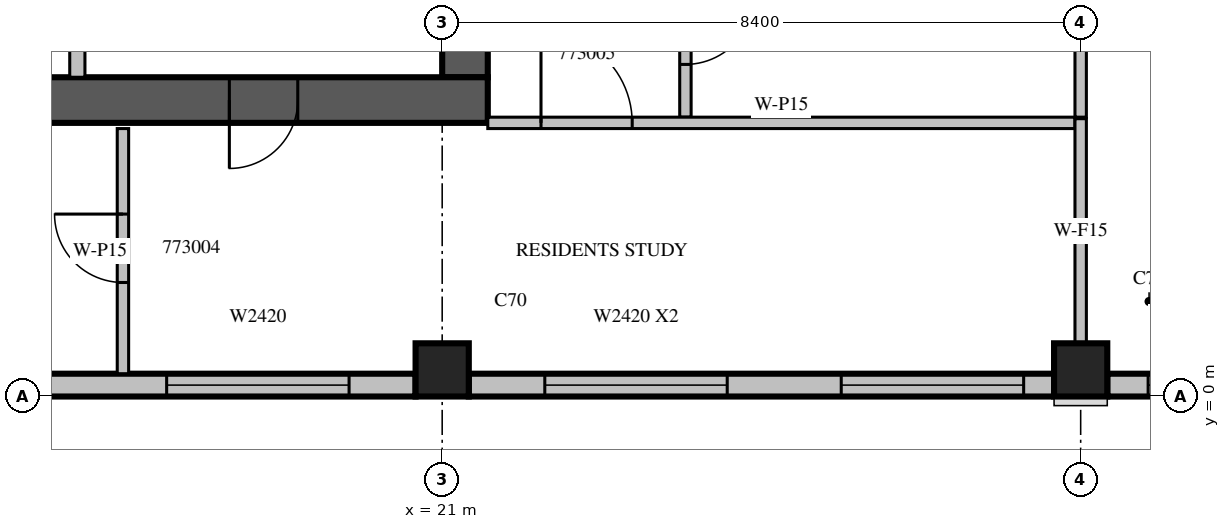
"""IFC4 building model, lengths in metres.
Left out: names, types, materials, properties, quantities, classifications, styles, units other than length and angle.
Written with IfcOpenShell. Run it as: python <this file> out.ifc"""

import sys

from ifc_helpers import new_model, si_unit, direction, frame, frame_2d, origin, origin_2d, place, context, subcontext, project, spatial, rectangle, extrude, source, transform, mapped, element, fill, save


model = new_model("IFC4")
c1 = context("Model", 3, precision=1e-05, world=origin(), true_north=direction((0.0, 1.0)))
c2 = subcontext(c1, "Body", "Model", "MODEL_VIEW")
j1 = project(units=[si_unit("LENGTHUNIT", "METRE"), si_unit("PLANEANGLEUNIT", "RADIAN")], contexts=[c1])
p1 = place(None, origin())
s1 = spatial("IfcSite", under=j1, at=p1, CompositionType="ELEMENT")
p2 = place(p1, origin())
s2 = spatial("IfcBuilding", under=s1, at=p2, CompositionType="ELEMENT")
p3 = place(p2, frame((0.0, 0.0, 316.0)))
s3 = spatial("IfcBuildingStorey", under=s2, at=p3, CompositionType="ELEMENT", Elevation=316.0)
m1 = source(origin(), c2, "Body", "SweptSolid", [
    extrude(rectangle(XDim=0.7, YDim=0.7, at=origin_2d()), origin(), (0.0, 0.0, 1.0), 3.5),
])
for number, where, z_axis, x_axis in (
    (1, (21.0, 0.35, 0.0), (0.0, 0.0, 1.0), (1.0, 0.0, 0.0)),
    (2, (29.4, 0.35, 0.0), (0.0, 0.0, 1.0), (1.0, 0.0, 0.0)),
):
    element("IfcColumn", number, at=place(p3, frame(where, z_axis=z_axis, x_axis=x_axis)), inside=s3, PredefinedType="COLUMN", context=c2, shape_type="MappedRepresentation", body=[
        mapped(m1, transform((0.0, 0.0, 0.0), scale=1.0)),
    ])
m2 = source(origin(), c2, "Body", "SweptSolid", [
    extrude(rectangle(XDim=6.3, YDim=0.6, at=frame_2d((3.15, 0.0))), origin(), (0.0, 0.0, 1.0), 3.5),
])
p4 = place(p3, frame((21.3, 4.2, 0.0), z_axis=(0.0, 0.0, 1.0), x_axis=(0.0, 1.0, 0.0)))
e3 = element("IfcWall", 3, at=p4, inside=s3, PredefinedType="SHEAR", context=c2, shape_type="MappedRepresentation", body=[
    mapped(m2, transform((0.0, 0.0, 0.0), scale=1.0)),
])
m3 = source(origin(), c2, "Body", "SweptSolid", [
    extrude(rectangle(XDim=2.2, YDim=2.1, at=frame_2d((1.1, 1.05))), frame((0.0, 0.31, 0.0), z_axis=(0.0, -1.0, 0.0), x_axis=(1.0, 0.0, 0.0)), (0.0, 0.0, 1.0), 0.62),
])
p5 = place(p4, frame((4.0, 0.0, 0.0)))
e4 = element("IfcOpeningElement", 4, at=p5, cuts=e3, PredefinedType="OPENING", context=c2, shape_type="MappedRepresentation", body=[
    mapped(m3, transform((0.0, 0.0, 0.0), scale=1.0)),
])
m4 = source(origin(), c2, "Body", "SweptSolid", [
    extrude(rectangle(XDim=17.4, YDim=0.6, at=frame_2d((8.7, 0.0))), origin(), (0.0, 0.0, 1.0), 3.5),
])
p6 = place(p3, frame((4.2, 3.9, 0.0), z_axis=(0.0, 0.0, 1.0), x_axis=(1.0, 0.0, 0.0)))
e5 = element("IfcWall", 5, at=p6, inside=s3, PredefinedType="SHEAR", context=c2, shape_type="MappedRepresentation", body=[
    mapped(m4, transform((0.0, 0.0, 0.0), scale=1.0)),
])
m5 = source(origin(), c2, "Body", "SweptSolid", [
    extrude(rectangle(XDim=0.9, YDim=2.1, at=frame_2d((0.45, 1.05))), frame((0.0, 0.31, 0.0), z_axis=(0.0, -1.0, 0.0), x_axis=(1.0, 0.0, 0.0)), (0.0, 0.0, 1.0), 0.62),
])
p7 = place(p6, frame((14.0, 0.0, 0.0)))
e6 = element("IfcOpeningElement", 6, at=p7, cuts=e5, PredefinedType="OPENING", context=c2, shape_type="MappedRepresentation", body=[
    mapped(m5, transform((0.0, 0.0, 0.0), scale=1.0)),
])
m6 = source(origin(), c2, "Body", "SweptSolid", [
    extrude(rectangle(XDim=9.8, YDim=0.3, at=frame_2d((4.9, 0.0))), origin(), (0.0, 0.0, 1.0), 3.1),
])
p8 = place(p3, frame((10.85, 0.15, 0.0), z_axis=(0.0, 0.0, 1.0), x_axis=(1.0, 0.0, 0.0)))
e7 = element("IfcWall", 7, at=p8, inside=s3, PredefinedType="STANDARD", context=c2, shape_type="MappedRepresentation", body=[
    mapped(m6, transform((0.0, 0.0, 0.0), scale=1.0)),
])
m7 = source(origin(), c2, "Body", "SweptSolid", [
    extrude(rectangle(XDim=3.6, YDim=2.0, at=frame_2d((1.8, 1.0))), frame((0.0, 0.16, 0.0), z_axis=(0.0, -1.0, 0.0), x_axis=(1.0, 0.0, 0.0)), (0.0, 0.0, 1.0), 0.32),
])
p9 = place(p8, frame((0.475, 0.0, 0.6)))
e8 = element("IfcOpeningElement", 8, at=p9, cuts=e7, PredefinedType="OPENING", context=c2, shape_type="MappedRepresentation", body=[
    mapped(m7, transform((0.0, 0.0, 0.0), scale=1.0)),
])
m8 = source(origin(), c2, "Body", "SweptSolid", [
    extrude(rectangle(XDim=2.4, YDim=2.0, at=frame_2d((1.2, 1.0))), frame((0.0, 0.16, 0.0), z_axis=(0.0, -1.0, 0.0), x_axis=(1.0, 0.0, 0.0)), (0.0, 0.0, 1.0), 0.32),
])
p10 = place(p8, frame((6.525, 0.0, 0.6)))
e9 = element("IfcOpeningElement", 9, at=p10, cuts=e7, PredefinedType="OPENING", context=c2, shape_type="MappedRepresentation", body=[
    mapped(m8, transform((0.0, 0.0, 0.0), scale=1.0)),
])
m9 = source(origin(), c2, "Body", "SweptSolid", [
    extrude(rectangle(XDim=7.7, YDim=0.3, at=frame_2d((3.85, 0.0))), origin(), (0.0, 0.0, 1.0), 3.1),
])
p11 = place(p3, frame((21.35, 0.15, 0.0), z_axis=(0.0, 0.0, 1.0), x_axis=(1.0, 0.0, 0.0)))
e10 = element("IfcWall", 10, at=p11, inside=s3, PredefinedType="STANDARD", context=c2, shape_type="MappedRepresentation", body=[
    mapped(m9, transform((0.0, 0.0, 0.0), scale=1.0)),
])
p12 = place(p11, frame((1.0, 0.0, 0.6)))
e11 = element("IfcOpeningElement", 11, at=p12, cuts=e10, PredefinedType="OPENING", context=c2, shape_type="MappedRepresentation", body=[
    mapped(m8, transform((0.0, 0.0, 0.0), scale=1.0)),
])
p13 = place(p11, frame((4.9, 0.0, 0.6)))
e12 = element("IfcOpeningElement", 12, at=p13, cuts=e10, PredefinedType="OPENING", context=c2, shape_type="MappedRepresentation", body=[
    mapped(m8, transform((0.0, 0.0, 0.0), scale=1.0)),
])
p14 = place(p3, frame((29.75, 0.15, 0.0), z_axis=(0.0, 0.0, 1.0), x_axis=(1.0, 0.0, 0.0)))
e13 = element("IfcWall", 13, at=p14, inside=s3, PredefinedType="STANDARD", context=c2, shape_type="MappedRepresentation", body=[
    mapped(m9, transform((0.0, 0.0, 0.0), scale=1.0)),
])
m10 = source(origin(), c2, "Body", "SweptSolid", [
    extrude(rectangle(XDim=1.2, YDim=2.0, at=frame_2d((0.6, 1.0))), frame((0.0, 0.16, 0.0), z_axis=(0.0, -1.0, 0.0), x_axis=(1.0, 0.0, 0.0)), (0.0, 0.0, 1.0), 0.32),
])
p15 = place(p14, frame((0.537, 0.0, 0.6)))
e14 = element("IfcOpeningElement", 14, at=p15, cuts=e13, PredefinedType="OPENING", context=c2, shape_type="MappedRepresentation", body=[
    mapped(m10, transform((0.0, 0.0, 0.0), scale=1.0)),
])
p16 = place(p14, frame((6.062, 0.0, 0.6)))
e15 = element("IfcOpeningElement", 15, at=p16, cuts=e13, PredefinedType="OPENING", context=c2, shape_type="MappedRepresentation", body=[
    mapped(m10, transform((0.0, 0.0, 0.0), scale=1.0)),
])
p17 = place(p14, frame((2.7, 0.0, 0.6)))
e16 = element("IfcOpeningElement", 16, at=p17, cuts=e13, PredefinedType="OPENING", context=c2, shape_type="MappedRepresentation", body=[
    mapped(m8, transform((0.0, 0.0, 0.0), scale=1.0)),
])
m11 = source(origin(), c2, "Body", "SweptSolid", [
    extrude(rectangle(XDim=3.1, YDim=0.2, at=frame_2d((1.55, 0.0))), origin(), (0.0, 0.0, 1.0), 3.1),
])
p18 = place(p3, frame((16.2, 4.2, 0.0), z_axis=(0.0, 0.0, 1.0), x_axis=(0.0, 1.0, 0.0)))
e17 = element("IfcWall", 17, at=p18, inside=s3, PredefinedType="PARTITIONING", context=c2, shape_type="MappedRepresentation", body=[
    mapped(m11, transform((0.0, 0.0, 0.0), scale=1.0)),
])
m12 = source(origin(), c2, "Body", "SweptSolid", [
    extrude(rectangle(XDim=4.575, YDim=0.15, at=frame_2d((2.288, 0.0))), origin(), (0.0, 0.0, 1.0), 3.1),
])
p19 = place(p3, frame((24.2, 8.25, 0.0), z_axis=(0.0, 0.0, 1.0), x_axis=(0.0, -1.0, 0.0)))
e18 = element("IfcWall", 18, at=p19, inside=s3, PredefinedType="PARTITIONING", context=c2, shape_type="MappedRepresentation", body=[
    mapped(m12, transform((0.0, 0.0, 0.0), scale=1.0)),
])
m13 = source(origin(), c2, "Body", "SweptSolid", [
    extrude(rectangle(XDim=0.9, YDim=2.1, at=frame_2d((0.45, 1.05))), frame((0.0, 0.085, 0.0), z_axis=(0.0, -1.0, 0.0), x_axis=(1.0, 0.0, 0.0)), (0.0, 0.0, 1.0), 0.17),
])
p20 = place(p19, frame((2.981, 0.0, 0.0)))
e19 = element("IfcOpeningElement", 19, at=p20, cuts=e18, PredefinedType="OPENING", context=c2, shape_type="MappedRepresentation", body=[
    mapped(m13, transform((0.0, 0.0, 0.0), scale=1.0)),
])
p21 = place(p3, frame((29.4, 3.675, 0.0), z_axis=(0.0, 0.0, 1.0), x_axis=(0.0, 1.0, 0.0)))
e20 = element("IfcWall", 20, at=p21, inside=s3, PredefinedType="PARTITIONING", context=c2, shape_type="MappedRepresentation", body=[
    mapped(m12, transform((0.0, 0.0, 0.0), scale=1.0)),
])
m14 = source(origin(), c2, "Body", "SweptSolid", [
    extrude(rectangle(XDim=3.225, YDim=0.15, at=frame_2d((1.613, 0.0))), origin(), (0.0, 0.0, 1.0), 3.1),
])
p22 = place(p3, frame((16.8, 3.525, 0.0), z_axis=(0.0, 0.0, 1.0), x_axis=(0.0, -1.0, 0.0)))
e21 = element("IfcWall", 21, at=p22, inside=s3, PredefinedType="PARTITIONING", context=c2, shape_type="MappedRepresentation", body=[
    mapped(m14, transform((0.0, 0.0, 0.0), scale=1.0)),
])
p23 = place(p22, frame((1.125, 0.0, 0.0)))
e22 = element("IfcOpeningElement", 22, at=p23, cuts=e21, PredefinedType="OPENING", context=c2, shape_type="MappedRepresentation", body=[
    mapped(m13, transform((0.0, 0.0, 0.0), scale=1.0)),
])
m15 = source(origin(), c2, "Body", "SweptSolid", [
    extrude(rectangle(XDim=7.725, YDim=0.15, at=frame_2d((3.862, 0.0))), origin(), (0.0, 0.0, 1.0), 3.1),
])
p24 = place(p3, frame((21.6, 3.6, 0.0), z_axis=(0.0, 0.0, 1.0), x_axis=(1.0, 0.0, 0.0)))
e23 = element("IfcWall", 23, at=p24, inside=s3, PredefinedType="PARTITIONING", context=c2, shape_type="MappedRepresentation", body=[
    mapped(m15, transform((0.0, 0.0, 0.0), scale=1.0)),
])
m16 = source(origin(), c2, "Body", "SweptSolid", [
    extrude(rectangle(XDim=1.2, YDim=2.1, at=frame_2d((0.6, 1.05))), frame((0.0, 0.085, 0.0), z_axis=(0.0, -1.0, 0.0), x_axis=(1.0, 0.0, 0.0)), (0.0, 0.0, 1.0), 0.17),
])
p25 = place(p24, frame((0.7, 0.0, 0.0)))
e24 = element("IfcOpeningElement", 24, at=p25, cuts=e23, PredefinedType="OPENING", context=c2, shape_type="MappedRepresentation", body=[
    mapped(m16, transform((0.0, 0.0, 0.0), scale=1.0)),
])
m17 = source(origin(), c2, "Body", "SweptSolid", [
    extrude(rectangle(XDim=2.956, YDim=0.15, at=frame_2d((1.478, 0.0))), origin(), (0.0, 0.0, 1.0), 3.1),
])
p26 = place(p3, frame((29.4, 0.699, 0.0), z_axis=(0.0, 0.0, 1.0), x_axis=(0.0, 1.0, 0.0)))
e25 = element("IfcWall", 25, at=p26, inside=s3, PredefinedType="PARTITIONING", context=c2, shape_type="MappedRepresentation", body=[
    mapped(m17, transform((0.0, 0.0, 0.0), scale=1.0)),
])
m18 = source(origin(), c2, "Body", "SweptSolid", [
    extrude(rectangle(XDim=2.4, YDim=2.0, at=frame_2d((1.2, 1.0))), frame((0.0, 0.03, 0.0), z_axis=(0.0, -1.0, 0.0), x_axis=(1.0, 0.0, 0.0)), (0.0, 0.0, 1.0), 0.06),
])
p27 = place(p10, origin())
e26 = element("IfcWindow", 26, at=p27, inside=s3, PartitioningType="SINGLE_PANEL", PredefinedType="WINDOW", context=c2, shape_type="MappedRepresentation", body=[
    mapped(m18, transform((0.0, 0.0, 0.0), scale=1.0)),
])
fill(e9, e26)
p28 = place(p12, origin())
e27 = element("IfcWindow", 27, at=p28, inside=s3, PartitioningType="SINGLE_PANEL", PredefinedType="WINDOW", context=c2, shape_type="MappedRepresentation", body=[
    mapped(m18, transform((0.0, 0.0, 0.0), scale=1.0)),
])
fill(e11, e27)
p29 = place(p13, origin())
e28 = element("IfcWindow", 28, at=p29, inside=s3, PartitioningType="SINGLE_PANEL", PredefinedType="WINDOW", context=c2, shape_type="MappedRepresentation", body=[
    mapped(m18, transform((0.0, 0.0, 0.0), scale=1.0)),
])
fill(e12, e28)
m19 = source(origin(), c2, "Body", "SweptSolid", [
    extrude(rectangle(XDim=1.2, YDim=2.0, at=frame_2d((0.6, 1.0))), frame((0.0, 0.03, 0.0), z_axis=(0.0, -1.0, 0.0), x_axis=(1.0, 0.0, 0.0)), (0.0, 0.0, 1.0), 0.06),
])
p30 = place(p15, origin())
e29 = element("IfcWindow", 29, at=p30, inside=s3, PartitioningType="SINGLE_PANEL", PredefinedType="WINDOW", context=c2, shape_type="MappedRepresentation", body=[
    mapped(m19, transform((0.0, 0.0, 0.0), scale=1.0)),
])
fill(e14, e29)
m20 = source(origin(), c2, "Body", "SweptSolid", [
    extrude(rectangle(XDim=0.9, YDim=2.1, at=frame_2d((0.45, 1.05))), frame((0.0, 0.025, 0.0), z_axis=(0.0, -1.0, 0.0), x_axis=(1.0, 0.0, 0.0)), (0.0, 0.0, 1.0), 0.05),
])
p31 = place(p7, origin())
e30 = element("IfcDoor", 30, at=p31, inside=s3, OperationType="SINGLE_SWING_RIGHT", PredefinedType="DOOR", context=c2, shape_type="MappedRepresentation", body=[
    mapped(m20, transform((0.0, 0.0, 0.0), scale=1.0)),
])
fill(e6, e30)
p32 = place(p20, origin())
e31 = element("IfcDoor", 31, at=p32, inside=s3, OperationType="SINGLE_SWING_LEFT", PredefinedType="DOOR", context=c2, shape_type="MappedRepresentation", body=[
    mapped(m20, transform((0.0, 0.0, 0.0), scale=1.0)),
])
fill(e19, e31)
p33 = place(p23, origin())
e32 = element("IfcDoor", 32, at=p33, inside=s3, OperationType="SINGLE_SWING_RIGHT", PredefinedType="DOOR", context=c2, shape_type="MappedRepresentation", body=[
    mapped(m20, transform((0.0, 0.0, 0.0), scale=1.0)),
])
fill(e22, e32)
m21 = source(origin(), c2, "Body", "SweptSolid", [
    extrude(rectangle(XDim=1.2, YDim=2.1, at=frame_2d((0.6, 1.05))), frame((0.0, 0.025, 0.0), z_axis=(0.0, -1.0, 0.0), x_axis=(1.0, 0.0, 0.0)), (0.0, 0.0, 1.0), 0.05),
])
p34 = place(p25, origin())
e33 = element("IfcDoor", 33, at=p34, inside=s3, OperationType="SINGLE_SWING_LEFT", PredefinedType="DOOR", context=c2, shape_type="MappedRepresentation", body=[
    mapped(m21, transform((0.0, 0.0, 0.0), scale=1.0)),
])
fill(e24, e33)
save(model, sys.argv[1])
